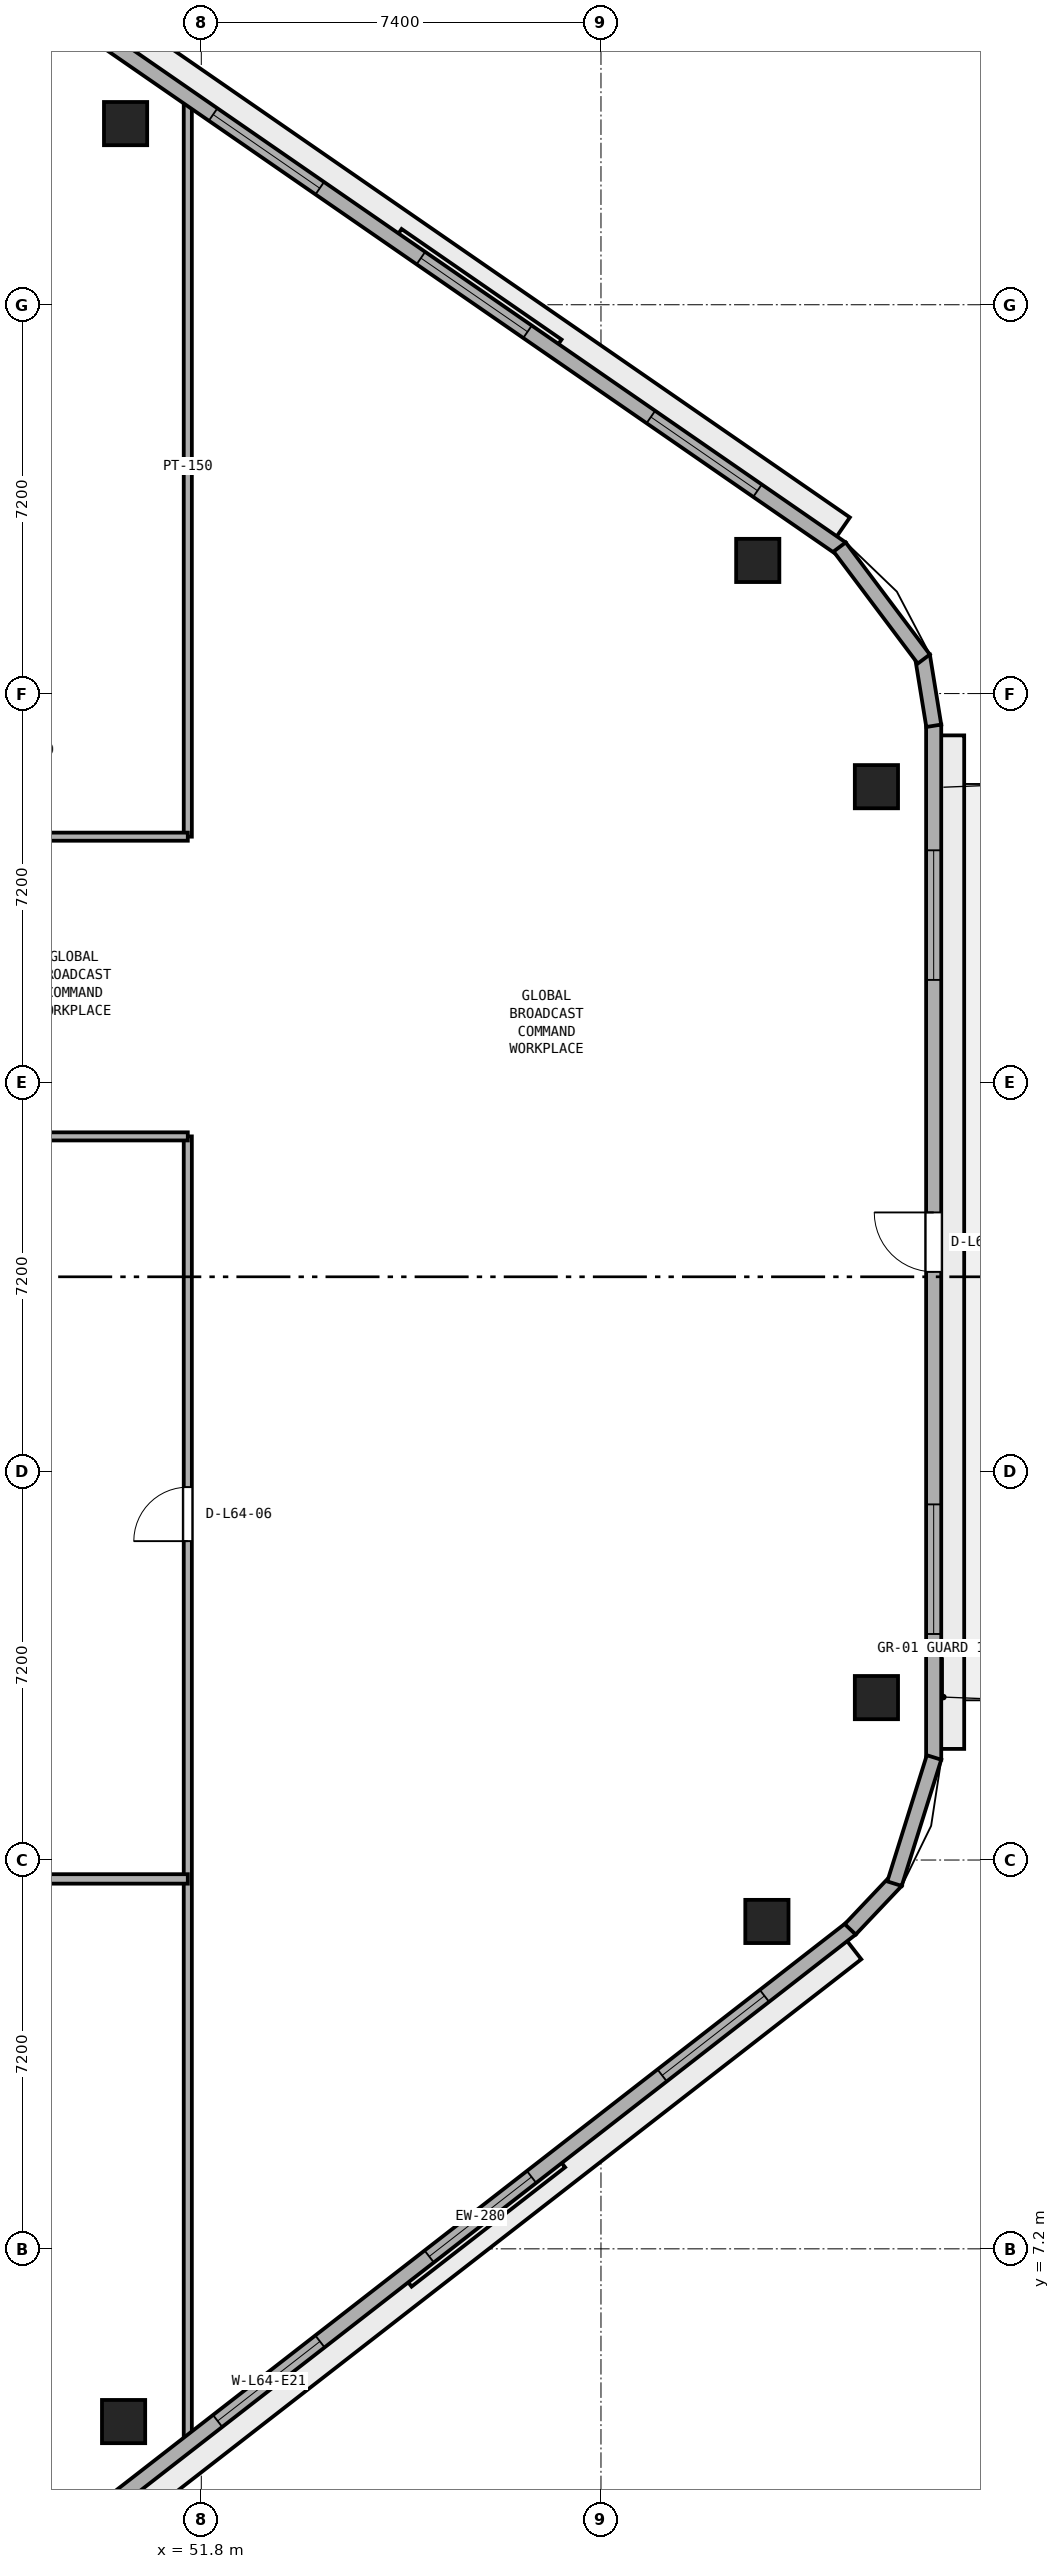
"""IFC4 building model, lengths in metres.
Left out: names, types, materials, properties, quantities, classifications, styles, units other than length and angle.
Written with IfcOpenShell. Run it as: python <this file> out.ifc"""

import sys

from ifc_helpers import new_model, si_unit, direction, frame, frame_2d, origin, origin_2d, place, context, subcontext, project, spatial, rectangle, extrude, element, fill, save


model = new_model("IFC4")
c1 = context("Model", 3, precision=1e-05, world=origin(), true_north=direction((0.0, 1.0)))
c2 = subcontext(c1, "Body", "Model", "MODEL_VIEW")
j1 = project(units=[si_unit("LENGTHUNIT", "METRE"), si_unit("PLANEANGLEUNIT", "RADIAN")], contexts=[c1])
p1 = place(None, origin())
s1 = spatial("IfcSite", under=j1, at=p1, CompositionType="ELEMENT")
p2 = place(p1, origin())
s2 = spatial("IfcBuilding", under=s1, at=p2, CompositionType="ELEMENT")
p3 = place(p2, frame((0.0, 0.0, 251.6)))
s3 = spatial("IfcBuildingStorey", under=s2, at=p3, CompositionType="ELEMENT", Elevation=251.6)
for number, where, z_axis, x_axis in (
    (1, (50.361, 4.002, 0.0), (0.0, 0.0, 1.0), (1.0, 0.0, 0.0)),
    (2, (62.272, 13.262, 0.0), (0.0, 0.0, 1.0), (1.0, 0.0, 0.0)),
    (3, (64.3, 17.408, 0.0), (0.0, 0.0, 1.0), (1.0, 0.0, 0.0)),
    (4, (64.3, 34.276, 0.0), (0.0, 0.0, 1.0), (1.0, 0.0, 0.0)),
    (5, (62.103, 38.465, 0.0), (0.0, 0.0, 1.0), (1.0, 0.0, 0.0)),
    (6, (50.398, 46.554, 0.0), (0.0, 0.0, 1.0), (1.0, 0.0, 0.0)),
):
    element("IfcColumn", number, at=place(p3, frame(where, z_axis=z_axis, x_axis=x_axis)), inside=s3, PredefinedType="COLUMN", context=c2, shape_type="SweptSolid", body=[
        extrude(rectangle(XDim=0.8, YDim=0.8, at=origin_2d()), origin(), (0.0, 0.0, 1.0), 3.8),
    ])
p4 = place(p3, frame((51.55, 3.546, 0.0), z_axis=(0.0, 0.0, 1.0), x_axis=(0.0, 1.0, 0.0)))
e7 = element("IfcWall", 7, at=p4, inside=s3, PredefinedType="PARTITIONING", context=c2, shape_type="SweptSolid", body=[
    extrude(rectangle(XDim=24.254, YDim=0.15, at=frame_2d((12.127, 0.0))), origin(), (0.0, 0.0, 1.0), 3.51),
])
p5 = place(p4, frame((16.759, 0.0, 0.0)))
e8 = element("IfcOpeningElement", 8, at=p5, cuts=e7, PredefinedType="OPENING", context=c2, shape_type="SweptSolid", body=[
    extrude(rectangle(XDim=1.0, YDim=2.12, at=frame_2d((0.5, 1.06))), frame((0.0, 0.085, 0.0), z_axis=(0.0, -1.0, 0.0), x_axis=(1.0, 0.0, 0.0)), (0.0, 0.0, 1.0), 0.17),
])
p6 = place(p3, frame((51.55, 33.35, 0.0), z_axis=(0.0, 0.0, 1.0), x_axis=(0.0, 1.0, 0.0)))
e9 = element("IfcWall", 9, at=p6, inside=s3, PredefinedType="PARTITIONING", context=c2, shape_type="SweptSolid", body=[
    extrude(rectangle(XDim=13.727, YDim=0.15, at=frame_2d((6.863, 0.0))), origin(), (0.0, 0.0, 1.0), 3.51),
])
p7 = place(p3, frame((38.35, 14.05, 0.0), z_axis=(0.0, 0.0, 1.0), x_axis=(1.0, 0.0, 0.0)))
e10 = element("IfcWall", 10, at=p7, inside=s3, PredefinedType="PARTITIONING", context=c2, shape_type="SweptSolid", body=[
    extrude(rectangle(XDim=13.2, YDim=0.175, at=frame_2d((6.6, 0.0))), origin(), (0.0, 0.0, 1.0), 3.51),
])
p8 = place(p7, frame((6.15, 0.0, 0.0)))
e11 = element("IfcOpeningElement", 11, at=p8, cuts=e10, PredefinedType="OPENING", context=c2, shape_type="SweptSolid", body=[
    extrude(rectangle(XDim=0.9, YDim=2.1, at=frame_2d((0.45, 1.05))), frame((0.0, 0.097, 0.0), z_axis=(0.0, -1.0, 0.0), x_axis=(1.0, 0.0, 0.0)), (0.0, 0.0, 1.0), 0.195),
])
p9 = place(p3, frame((48.74, 27.8, 0.0), z_axis=(0.0, 0.0, 1.0), x_axis=(1.0, 0.0, 0.0)))
e12 = element("IfcWall", 12, at=p9, inside=s3, PredefinedType="PARTITIONING", context=c2, shape_type="SweptSolid", body=[
    extrude(rectangle(XDim=2.81, YDim=0.15, at=frame_2d((1.405, 0.0))), origin(), (0.0, 0.0, 1.0), 3.51),
])
p10 = place(p3, frame((48.74, 33.35, 0.0), z_axis=(0.0, 0.0, 1.0), x_axis=(1.0, 0.0, 0.0)))
e13 = element("IfcWall", 13, at=p10, inside=s3, PredefinedType="PARTITIONING", context=c2, shape_type="SweptSolid", body=[
    extrude(rectangle(XDim=2.81, YDim=0.15, at=frame_2d((1.405, 0.0))), origin(), (0.0, 0.0, 1.0), 2.893),
])
p11 = place(p3, frame((50.104, 2.459, 0.0), z_axis=(0.0, 0.0, 1.0), x_axis=(0.789464857485, 0.613795763097, 0.0)))
e14 = element("IfcWall", 14, at=p11, inside=s3, PredefinedType="STANDARD", context=c2, shape_type="SweptSolid", body=[
    extrude(rectangle(XDim=17.387, YDim=0.28, at=frame_2d((8.694, 0.0))), origin(), (0.0, 0.0, 1.0), 3.51),
])
p12 = place(p11, frame((2.531, 0.0, 0.9)))
e15 = element("IfcOpeningElement", 15, at=p12, cuts=e14, PredefinedType="OPENING", context=c2, shape_type="SweptSolid", body=[
    extrude(rectangle(XDim=2.4, YDim=1.75, at=frame_2d((1.2, 0.875))), frame((0.0, 0.15, 0.0), z_axis=(0.0, -1.0, 0.0), x_axis=(1.0, 0.0, 0.0)), (0.0, 0.0, 1.0), 0.3),
])
p13 = place(p11, frame((7.494, 0.0, 0.9)))
e16 = element("IfcOpeningElement", 16, at=p13, cuts=e14, PredefinedType="OPENING", context=c2, shape_type="SweptSolid", body=[
    extrude(rectangle(XDim=2.4, YDim=1.75, at=frame_2d((1.2, 0.875))), frame((0.0, 0.15, 0.0), z_axis=(0.0, -1.0, 0.0), x_axis=(1.0, 0.0, 0.0)), (0.0, 0.0, 1.0), 0.3),
])
p14 = place(p11, frame((12.956, 0.0, 0.9)))
e17 = element("IfcOpeningElement", 17, at=p14, cuts=e14, PredefinedType="OPENING", context=c2, shape_type="SweptSolid", body=[
    extrude(rectangle(XDim=2.4, YDim=1.75, at=frame_2d((1.2, 0.875))), frame((0.0, 0.15, 0.0), z_axis=(0.0, -1.0, 0.0), x_axis=(1.0, 0.0, 0.0)), (0.0, 0.0, 1.0), 0.3),
])
p15 = place(p3, frame((65.36, 16.258, 0.0), z_axis=(0.0, 0.0, 1.0), x_axis=(0.0, 1.0, 0.0)))
e18 = element("IfcWall", 18, at=p15, inside=s3, PredefinedType="STANDARD", context=c2, shape_type="SweptSolid", body=[
    extrude(rectangle(XDim=19.168, YDim=0.28, at=frame_2d((9.584, 0.0))), origin(), (0.0, 0.0, 1.0), 3.51),
])
p16 = place(p15, frame((9.034, 0.0, 0.0)))
e19 = element("IfcOpeningElement", 19, at=p16, cuts=e18, PredefinedType="OPENING", context=c2, shape_type="SweptSolid", body=[
    extrude(rectangle(XDim=1.1, YDim=2.2, at=frame_2d((0.55, 1.1))), frame((0.0, 0.15, 0.0), z_axis=(0.0, -1.0, 0.0), x_axis=(1.0, 0.0, 0.0)), (0.0, 0.0, 1.0), 0.3),
])
p17 = place(p15, frame((2.328, 0.0, 0.9)))
e20 = element("IfcOpeningElement", 20, at=p17, cuts=e18, PredefinedType="OPENING", context=c2, shape_type="SweptSolid", body=[
    extrude(rectangle(XDim=2.4, YDim=1.75, at=frame_2d((1.2, 0.875))), frame((0.0, 0.15, 0.0), z_axis=(0.0, -1.0, 0.0), x_axis=(1.0, 0.0, 0.0)), (0.0, 0.0, 1.0), 0.3),
])
p18 = place(p15, frame((14.44, 0.0, 0.9)))
e21 = element("IfcOpeningElement", 21, at=p18, cuts=e18, PredefinedType="OPENING", context=c2, shape_type="SweptSolid", body=[
    extrude(rectangle(XDim=2.4, YDim=1.75, at=frame_2d((1.2, 0.875))), frame((0.0, 0.15, 0.0), z_axis=(0.0, -1.0, 0.0), x_axis=(1.0, 0.0, 0.0)), (0.0, 0.0, 1.0), 0.3),
])
p19 = place(p3, frame((63.651, 38.683, 0.0), z_axis=(0.0, 0.0, 1.0), x_axis=(-0.822655095, 0.568540759022, 0.0)))
e22 = element("IfcWall", 22, at=p19, inside=s3, PredefinedType="STANDARD", context=c2, shape_type="SweptSolid", body=[
    extrude(rectangle(XDim=16.528, YDim=0.28, at=frame_2d((8.264, 0.0))), origin(), (0.0, 0.0, 1.0), 3.51),
])
p20 = place(p19, frame((1.888, 0.0, 0.9)))
e23 = element("IfcOpeningElement", 23, at=p20, cuts=e22, PredefinedType="OPENING", context=c2, shape_type="SweptSolid", body=[
    extrude(rectangle(XDim=2.4, YDim=1.75, at=frame_2d((1.2, 0.875))), frame((0.0, 0.15, 0.0), z_axis=(0.0, -1.0, 0.0), x_axis=(1.0, 0.0, 0.0)), (0.0, 0.0, 1.0), 0.3),
])
p21 = place(p19, frame((7.064, 0.0, 0.9)))
e24 = element("IfcOpeningElement", 24, at=p21, cuts=e22, PredefinedType="OPENING", context=c2, shape_type="SweptSolid", body=[
    extrude(rectangle(XDim=2.4, YDim=1.75, at=frame_2d((1.2, 0.875))), frame((0.0, 0.15, 0.0), z_axis=(0.0, -1.0, 0.0), x_axis=(1.0, 0.0, 0.0)), (0.0, 0.0, 1.0), 0.3),
])
p22 = place(p19, frame((11.74, 0.0, 0.9)))
e25 = element("IfcOpeningElement", 25, at=p22, cuts=e22, PredefinedType="OPENING", context=c2, shape_type="SweptSolid", body=[
    extrude(rectangle(XDim=2.4, YDim=1.75, at=frame_2d((1.2, 0.875))), frame((0.0, 0.15, 0.0), z_axis=(0.0, -1.0, 0.0), x_axis=(1.0, 0.0, 0.0)), (0.0, 0.0, 1.0), 0.3),
])
p23 = place(p3, frame((63.815, 13.117, 0.0), z_axis=(0.0, 0.0, 1.0), x_axis=(0.687733716128, 0.725963040176, 0.0)))
e26 = element("IfcWall", 26, at=p23, inside=s3, PredefinedType="STANDARD", context=c2, shape_type="SweptSolid", body=[
    extrude(rectangle(XDim=1.239, YDim=0.28, at=frame_2d((0.62, 0.0))), origin(), (0.0, 0.0, 1.0), 3.51),
])
p24 = place(p3, frame((64.635, 13.962, 0.0), z_axis=(0.0, 0.0, 1.0), x_axis=(0.298649578722, 0.954362839348, 0.0)))
e27 = element("IfcWall", 27, at=p24, inside=s3, PredefinedType="STANDARD", context=c2, shape_type="SweptSolid", body=[
    extrude(rectangle(XDim=2.449, YDim=0.28, at=frame_2d((1.225, 0.0))), origin(), (0.0, 0.0, 1.0), 3.51),
])
p25 = place(p3, frame((65.362, 35.403, 0.0), z_axis=(0.0, 0.0, 1.0), x_axis=(-0.160271674114, 0.987072940809, 0.0)))
e28 = element("IfcWall", 28, at=p25, inside=s3, PredefinedType="STANDARD", context=c2, shape_type="SweptSolid", body=[
    extrude(rectangle(XDim=1.315, YDim=0.28, at=frame_2d((0.657, 0.0))), origin(), (0.0, 0.0, 1.0), 3.51),
])
p26 = place(p3, frame((65.177, 36.639, 0.0), z_axis=(0.0, 0.0, 1.0), x_axis=(-0.600436386467, 0.799672524104, 0.0)))
e29 = element("IfcWall", 29, at=p26, inside=s3, PredefinedType="STANDARD", context=c2, shape_type="SweptSolid", body=[
    extrude(rectangle(XDim=2.595, YDim=0.28, at=frame_2d((1.298, 0.0))), origin(), (0.0, 0.0, 1.0), 3.51),
])
p27 = place(p5, origin())
e30 = element("IfcDoor", 30, at=p27, inside=s3, OperationType="SINGLE_SWING_LEFT", PredefinedType="DOOR", context=c2, shape_type="SweptSolid", body=[
    extrude(rectangle(XDim=1.0, YDim=2.12, at=frame_2d((0.5, 1.06))), frame((0.0, 0.025, 0.0), z_axis=(0.0, -1.0, 0.0), x_axis=(1.0, 0.0, 0.0)), (0.0, 0.0, 1.0), 0.05),
])
fill(e8, e30)
p28 = place(p12, origin())
e31 = element("IfcWindow", 31, at=p28, inside=s3, PartitioningType="SINGLE_PANEL", PredefinedType="WINDOW", context=c2, shape_type="SweptSolid", body=[
    extrude(rectangle(XDim=2.4, YDim=1.75, at=frame_2d((1.2, 0.875))), frame((0.0, 0.03, 0.0), z_axis=(0.0, -1.0, 0.0), x_axis=(1.0, 0.0, 0.0)), (0.0, 0.0, 1.0), 0.06),
])
fill(e15, e31)
p29 = place(p13, origin())
e32 = element("IfcWindow", 32, at=p29, inside=s3, PartitioningType="SINGLE_PANEL", PredefinedType="WINDOW", context=c2, shape_type="SweptSolid", body=[
    extrude(rectangle(XDim=2.4, YDim=1.75, at=frame_2d((1.2, 0.875))), frame((0.0, 0.03, 0.0), z_axis=(0.0, -1.0, 0.0), x_axis=(1.0, 0.0, 0.0)), (0.0, 0.0, 1.0), 0.06),
])
fill(e16, e32)
p30 = place(p14, origin())
e33 = element("IfcWindow", 33, at=p30, inside=s3, PartitioningType="SINGLE_PANEL", PredefinedType="WINDOW", context=c2, shape_type="SweptSolid", body=[
    extrude(rectangle(XDim=2.4, YDim=1.75, at=frame_2d((1.2, 0.875))), frame((0.0, 0.03, 0.0), z_axis=(0.0, -1.0, 0.0), x_axis=(1.0, 0.0, 0.0)), (0.0, 0.0, 1.0), 0.06),
])
fill(e17, e33)
p31 = place(p16, origin())
e34 = element("IfcDoor", 34, at=p31, inside=s3, OperationType="SINGLE_SWING_RIGHT", PredefinedType="DOOR", context=c2, shape_type="SweptSolid", body=[
    extrude(rectangle(XDim=1.1, YDim=2.2, at=frame_2d((0.55, 1.1))), frame((0.0, 0.025, 0.0), z_axis=(0.0, -1.0, 0.0), x_axis=(1.0, 0.0, 0.0)), (0.0, 0.0, 1.0), 0.05),
])
fill(e19, e34)
p32 = place(p17, origin())
e35 = element("IfcWindow", 35, at=p32, inside=s3, PartitioningType="SINGLE_PANEL", PredefinedType="WINDOW", context=c2, shape_type="SweptSolid", body=[
    extrude(rectangle(XDim=2.4, YDim=1.75, at=frame_2d((1.2, 0.875))), frame((0.0, 0.03, 0.0), z_axis=(0.0, -1.0, 0.0), x_axis=(1.0, 0.0, 0.0)), (0.0, 0.0, 1.0), 0.06),
])
fill(e20, e35)
p33 = place(p18, origin())
e36 = element("IfcWindow", 36, at=p33, inside=s3, PartitioningType="SINGLE_PANEL", PredefinedType="WINDOW", context=c2, shape_type="SweptSolid", body=[
    extrude(rectangle(XDim=2.4, YDim=1.75, at=frame_2d((1.2, 0.875))), frame((0.0, 0.03, 0.0), z_axis=(0.0, -1.0, 0.0), x_axis=(1.0, 0.0, 0.0)), (0.0, 0.0, 1.0), 0.06),
])
fill(e21, e36)
p34 = place(p20, origin())
e37 = element("IfcWindow", 37, at=p34, inside=s3, PartitioningType="SINGLE_PANEL", PredefinedType="WINDOW", context=c2, shape_type="SweptSolid", body=[
    extrude(rectangle(XDim=2.4, YDim=1.75, at=frame_2d((1.2, 0.875))), frame((0.0, 0.03, 0.0), z_axis=(0.0, -1.0, 0.0), x_axis=(1.0, 0.0, 0.0)), (0.0, 0.0, 1.0), 0.06),
])
fill(e23, e37)
p35 = place(p21, origin())
e38 = element("IfcWindow", 38, at=p35, inside=s3, PartitioningType="SINGLE_PANEL", PredefinedType="WINDOW", context=c2, shape_type="SweptSolid", body=[
    extrude(rectangle(XDim=2.4, YDim=1.75, at=frame_2d((1.2, 0.875))), frame((0.0, 0.03, 0.0), z_axis=(0.0, -1.0, 0.0), x_axis=(1.0, 0.0, 0.0)), (0.0, 0.0, 1.0), 0.06),
])
fill(e24, e38)
p36 = place(p22, origin())
e39 = element("IfcWindow", 39, at=p36, inside=s3, PartitioningType="SINGLE_PANEL", PredefinedType="WINDOW", context=c2, shape_type="SweptSolid", body=[
    extrude(rectangle(XDim=2.4, YDim=1.75, at=frame_2d((1.2, 0.875))), frame((0.0, 0.03, 0.0), z_axis=(0.0, -1.0, 0.0), x_axis=(1.0, 0.0, 0.0)), (0.0, 0.0, 1.0), 0.06),
])
fill(e25, e39)
save(model, sys.argv[1])
